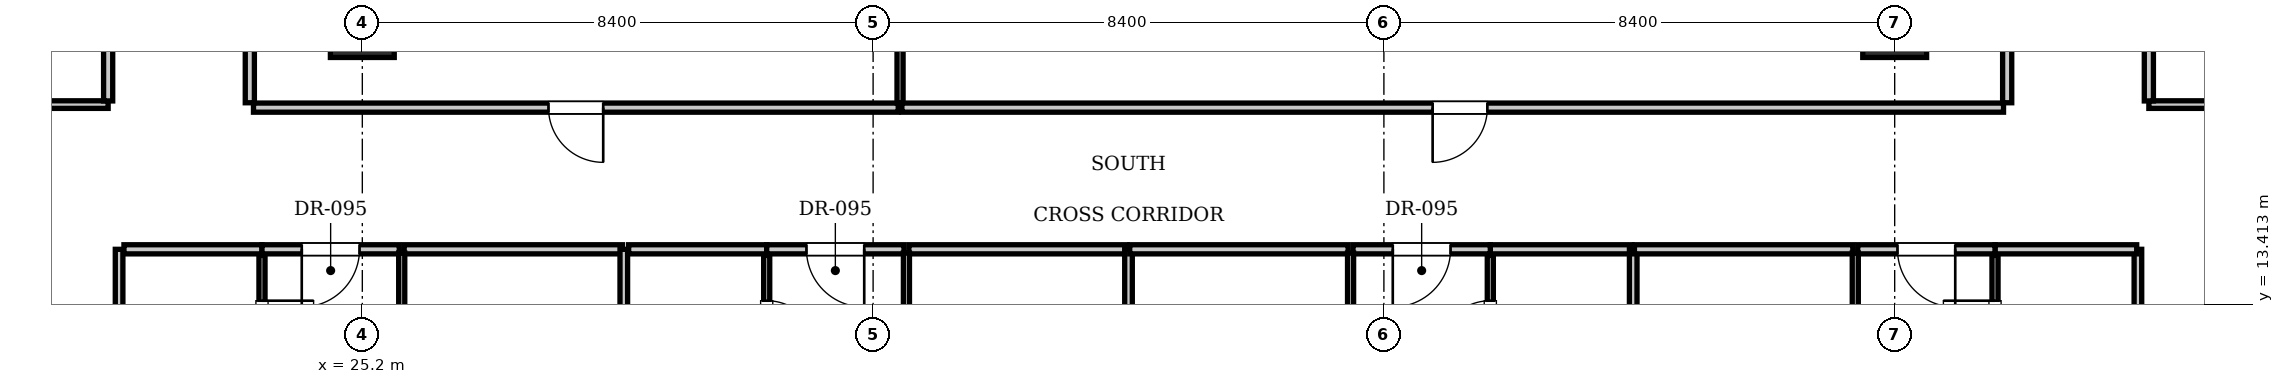
"""IFC4 building model, lengths in metres.
Left out: names, types, materials, properties, quantities, classifications, styles, units other than length and angle.
Written with IfcOpenShell. Run it as: python <this file> out.ifc"""

import sys

from ifc_helpers import new_model, si_unit, direction, frame, frame_2d, origin, origin_2d, place, context, subcontext, project, spatial, rectangle, extrude, element, fill, save


model = new_model("IFC4")
c1 = context("Model", 3, precision=1e-05, world=origin(), true_north=direction((0.0, 1.0)))
c2 = subcontext(c1, "Body", "Model", "MODEL_VIEW")
j1 = project(units=[si_unit("LENGTHUNIT", "METRE"), si_unit("PLANEANGLEUNIT", "RADIAN")], contexts=[c1])
p1 = place(None, origin())
s1 = spatial("IfcSite", under=j1, at=p1, CompositionType="ELEMENT")
p2 = place(p1, origin())
s2 = spatial("IfcBuilding", under=s1, at=p2, CompositionType="ELEMENT")
p3 = place(p2, frame((0.0, 0.0, 42.35)))
s3 = spatial("IfcBuildingStorey", under=s2, at=p3, CompositionType="ELEMENT", Elevation=42.35)
for number, where, z_axis, x_axis in (
    (1, (25.2, 18.0, 0.0), (0.0, 0.0, 1.0), (1.0, 0.0, 0.0)),
    (2, (50.4, 18.0, 0.0), (0.0, 0.0, 1.0), (1.0, 0.0, 0.0)),
):
    element("IfcColumn", number, at=place(p3, frame(where, z_axis=z_axis, x_axis=x_axis)), inside=s3, PredefinedType="COLUMN", context=c2, shape_type="SweptSolid", body=[
        extrude(rectangle(XDim=1.05, YDim=1.05, at=origin_2d()), origin(), (0.0, 0.0, 1.0), 3.85),
    ])
for number, where, z_axis, x_axis in (
    (3, (23.35, 16.73, 0.0), (0.0, 0.0, 1.0), (0.0, 1.0, 0.0)),
    (4, (52.25, 16.73, 0.0), (0.0, 0.0, 1.0), (0.0, 1.0, 0.0)),
):
    element("IfcWall", number, at=place(p3, frame(where, z_axis=z_axis, x_axis=x_axis)), inside=s3, PredefinedType="PARTITIONING", context=c2, shape_type="SweptSolid", body=[
        extrude(rectangle(XDim=7.53, YDim=0.15, at=frame_2d((3.765, 0.0))), origin(), (0.0, 0.0, 1.0), 3.61),
    ])
p4 = place(p3, frame((23.41, 16.65, 0.0), z_axis=(0.0, 0.0, 1.0), x_axis=(1.0, 0.0, 0.0)))
e5 = element("IfcWall", 5, at=p4, inside=s3, PredefinedType="PARTITIONING", context=c2, shape_type="SweptSolid", body=[
    extrude(rectangle(XDim=10.603, YDim=0.15, at=frame_2d((5.302, 0.0))), origin(), (0.0, 0.0, 1.0), 3.61),
])
p5 = place(p4, frame((4.852, 0.0, 0.0)))
e6 = element("IfcOpeningElement", 6, at=p5, cuts=e5, PredefinedType="OPENING", context=c2, shape_type="SweptSolid", body=[
    extrude(rectangle(XDim=0.9, YDim=2.1, at=frame_2d((0.45, 1.05))), frame((0.0, 0.085, 0.0), z_axis=(0.0, -1.0, 0.0), x_axis=(1.0, 0.0, 0.0)), (0.0, 0.0, 1.0), 0.17),
])
p6 = place(p3, frame((34.043, 16.73, 0.0), z_axis=(0.0, 0.0, 1.0), x_axis=(0.0, 1.0, 0.0)))
e7 = element("IfcWall", 7, at=p6, inside=s3, PredefinedType="PARTITIONING", context=c2, shape_type="SweptSolid", body=[
    extrude(rectangle(XDim=7.53, YDim=0.1, at=frame_2d((3.765, 0.0))), origin(), (0.0, 0.0, 1.0), 3.61),
])
p7 = place(p3, frame((34.073, 16.65, 0.0), z_axis=(0.0, 0.0, 1.0), x_axis=(1.0, 0.0, 0.0)))
e8 = element("IfcWall", 8, at=p7, inside=s3, PredefinedType="PARTITIONING", context=c2, shape_type="SweptSolid", body=[
    extrude(rectangle(XDim=18.117, YDim=0.15, at=frame_2d((9.059, 0.0))), origin(), (0.0, 0.0, 1.0), 3.61),
])
p8 = place(p7, frame((8.729, 0.0, 0.0)))
e9 = element("IfcOpeningElement", 9, at=p8, cuts=e8, PredefinedType="OPENING", context=c2, shape_type="SweptSolid", body=[
    extrude(rectangle(XDim=0.9, YDim=2.1, at=frame_2d((0.45, 1.05))), frame((0.0, 0.085, 0.0), z_axis=(0.0, -1.0, 0.0), x_axis=(1.0, 0.0, 0.0)), (0.0, 0.0, 1.0), 0.17),
])
for number, where, z_axis, x_axis in (
    (10, (21.2, 0.1, 0.0), (0.0, 0.0, 1.0), (0.0, 1.0, 0.0)),
    (11, (54.4, 0.1, 0.0), (0.0, 0.0, 1.0), (0.0, 1.0, 0.0)),
):
    element("IfcWall", number, at=place(p3, frame(where, z_axis=z_axis, x_axis=x_axis)), inside=s3, PredefinedType="PARTITIONING", context=c2, shape_type="SweptSolid", body=[
        extrude(rectangle(XDim=14.22, YDim=0.125, at=frame_2d((7.11, 0.0))), origin(), (0.0, 0.0, 1.0), 3.61),
    ])
p9 = place(p3, frame((21.28, 14.32, 0.0), z_axis=(0.0, 0.0, 1.0), x_axis=(1.0, 0.0, 0.0)))
e12 = element("IfcWall", 12, at=p9, inside=s3, PredefinedType="PARTITIONING", context=c2, shape_type="SweptSolid", body=[
    extrude(rectangle(XDim=2.27, YDim=0.15, at=frame_2d((1.135, 0.0))), origin(), (0.0, 0.0, 1.0), 3.61),
])
p10 = place(p3, frame((23.55, 11.88, 0.0), z_axis=(0.0, 0.0, 1.0), x_axis=(0.0, 1.0, 0.0)))
e13 = element("IfcWall", 13, at=p10, inside=s3, PredefinedType="PARTITIONING", context=c2, shape_type="SweptSolid", body=[
    extrude(rectangle(XDim=2.34, YDim=0.1, at=frame_2d((1.17, 0.0))), origin(), (0.0, 0.0, 1.0), 3.61),
])
p11 = place(p10, frame((0.745, 0.0, 0.0)))
e14 = element("IfcOpeningElement", 14, at=p11, cuts=e13, PredefinedType="OPENING", context=c2, shape_type="SweptSolid", body=[
    extrude(rectangle(XDim=0.85, YDim=2.1, at=frame_2d((0.425, 1.05))), frame((0.0, 0.06, 0.0), z_axis=(0.0, -1.0, 0.0), x_axis=(1.0, 0.0, 0.0)), (0.0, 0.0, 1.0), 0.12),
])
p12 = place(p3, frame((23.55, 14.32, 0.0), z_axis=(0.0, 0.0, 1.0), x_axis=(1.0, 0.0, 0.0)))
e15 = element("IfcWall", 15, at=p12, inside=s3, PredefinedType="PARTITIONING", context=c2, shape_type="SweptSolid", body=[
    extrude(rectangle(XDim=2.258, YDim=0.15, at=frame_2d((1.129, 0.0))), origin(), (0.0, 0.0, 1.0), 3.61),
])
p13 = place(p12, frame((0.654, 0.0, 0.0)))
e16 = element("IfcOpeningElement", 16, at=p13, cuts=e15, PredefinedType="OPENING", context=c2, shape_type="SweptSolid", body=[
    extrude(rectangle(XDim=0.95, YDim=2.15, at=frame_2d((0.475, 1.075))), frame((0.0, 0.085, 0.0), z_axis=(0.0, -1.0, 0.0), x_axis=(1.0, 0.0, 0.0)), (0.0, 0.0, 1.0), 0.17),
])
p14 = place(p3, frame((25.888, 14.32, 0.0), z_axis=(0.0, 0.0, 1.0), x_axis=(1.0, 0.0, 0.0)))
e17 = element("IfcWall", 17, at=p14, inside=s3, PredefinedType="PARTITIONING", context=c2, shape_type="SweptSolid", body=[
    extrude(rectangle(XDim=3.592, YDim=0.15, at=frame_2d((1.796, 0.0))), origin(), (0.0, 0.0, 1.0), 3.61),
])
p15 = place(p3, frame((25.848, 0.03, 0.0), z_axis=(0.0, 0.0, 1.0), x_axis=(0.0, 1.0, 0.0)))
e18 = element("IfcWall", 18, at=p15, inside=s3, PredefinedType="PARTITIONING", context=c2, shape_type="SweptSolid", body=[
    extrude(rectangle(XDim=14.23, YDim=0.1, at=frame_2d((7.115, 0.0))), origin(), (0.0, 0.0, 1.0), 3.61),
])
p16 = place(p15, frame((1.6, 0.0, 0.0)))
e19 = element("IfcOpeningElement", 19, at=p16, cuts=e18, PredefinedType="OPENING", context=c2, shape_type="SweptSolid", body=[
    extrude(rectangle(XDim=0.9, YDim=2.1, at=frame_2d((0.45, 1.05))), frame((0.0, 0.06, 0.0), z_axis=(0.0, -1.0, 0.0), x_axis=(1.0, 0.0, 0.0)), (0.0, 0.0, 1.0), 0.12),
])
p17 = place(p3, frame((29.5, 0.1, 0.0), z_axis=(0.0, 0.0, 1.0), x_axis=(0.0, 1.0, 0.0)))
e20 = element("IfcWall", 20, at=p17, inside=s3, PredefinedType="PARTITIONING", context=c2, shape_type="SweptSolid", body=[
    extrude(rectangle(XDim=14.22, YDim=0.125, at=frame_2d((7.11, 0.0))), origin(), (0.0, 0.0, 1.0), 3.207),
])
p18 = place(p3, frame((29.58, 14.32, 0.0), z_axis=(0.0, 0.0, 1.0), x_axis=(1.0, 0.0, 0.0)))
e21 = element("IfcWall", 21, at=p18, inside=s3, PredefinedType="PARTITIONING", context=c2, shape_type="SweptSolid", body=[
    extrude(rectangle(XDim=2.27, YDim=0.15, at=frame_2d((1.135, 0.0))), origin(), (0.0, 0.0, 1.0), 3.61),
])
p19 = place(p3, frame((31.85, 11.88, 0.0), z_axis=(0.0, 0.0, 1.0), x_axis=(0.0, 1.0, 0.0)))
e22 = element("IfcWall", 22, at=p19, inside=s3, PredefinedType="PARTITIONING", context=c2, shape_type="SweptSolid", body=[
    extrude(rectangle(XDim=2.34, YDim=0.1, at=frame_2d((1.17, 0.0))), origin(), (0.0, 0.0, 1.0), 3.61),
])
p20 = place(p19, frame((0.745, 0.0, 0.0)))
e23 = element("IfcOpeningElement", 23, at=p20, cuts=e22, PredefinedType="OPENING", context=c2, shape_type="SweptSolid", body=[
    extrude(rectangle(XDim=0.85, YDim=2.1, at=frame_2d((0.425, 1.05))), frame((0.0, 0.06, 0.0), z_axis=(0.0, -1.0, 0.0), x_axis=(1.0, 0.0, 0.0)), (0.0, 0.0, 1.0), 0.12),
])
p21 = place(p3, frame((31.85, 14.32, 0.0), z_axis=(0.0, 0.0, 1.0), x_axis=(1.0, 0.0, 0.0)))
e24 = element("IfcWall", 24, at=p21, inside=s3, PredefinedType="PARTITIONING", context=c2, shape_type="SweptSolid", body=[
    extrude(rectangle(XDim=2.258, YDim=0.15, at=frame_2d((1.129, 0.0))), origin(), (0.0, 0.0, 1.0), 3.61),
])
p22 = place(p21, frame((0.654, 0.0, 0.0)))
e25 = element("IfcOpeningElement", 25, at=p22, cuts=e24, PredefinedType="OPENING", context=c2, shape_type="SweptSolid", body=[
    extrude(rectangle(XDim=0.95, YDim=2.15, at=frame_2d((0.475, 1.075))), frame((0.0, 0.085, 0.0), z_axis=(0.0, -1.0, 0.0), x_axis=(1.0, 0.0, 0.0)), (0.0, 0.0, 1.0), 0.17),
])
p23 = place(p3, frame((34.188, 14.32, 0.0), z_axis=(0.0, 0.0, 1.0), x_axis=(1.0, 0.0, 0.0)))
e26 = element("IfcWall", 26, at=p23, inside=s3, PredefinedType="PARTITIONING", context=c2, shape_type="SweptSolid", body=[
    extrude(rectangle(XDim=3.592, YDim=0.15, at=frame_2d((1.796, 0.0))), origin(), (0.0, 0.0, 1.0), 3.61),
])
p24 = place(p3, frame((34.148, 0.03, 0.0), z_axis=(0.0, 0.0, 1.0), x_axis=(0.0, 1.0, 0.0)))
e27 = element("IfcWall", 27, at=p24, inside=s3, PredefinedType="PARTITIONING", context=c2, shape_type="SweptSolid", body=[
    extrude(rectangle(XDim=14.23, YDim=0.1, at=frame_2d((7.115, 0.0))), origin(), (0.0, 0.0, 1.0), 3.61),
])
p25 = place(p24, frame((1.6, 0.0, 0.0)))
e28 = element("IfcOpeningElement", 28, at=p25, cuts=e27, PredefinedType="OPENING", context=c2, shape_type="SweptSolid", body=[
    extrude(rectangle(XDim=0.9, YDim=2.1, at=frame_2d((0.45, 1.05))), frame((0.0, 0.06, 0.0), z_axis=(0.0, -1.0, 0.0), x_axis=(1.0, 0.0, 0.0)), (0.0, 0.0, 1.0), 0.12),
])
p26 = place(p3, frame((37.8, 0.1, 0.0), z_axis=(0.0, 0.0, 1.0), x_axis=(0.0, 1.0, 0.0)))
e29 = element("IfcWall", 29, at=p26, inside=s3, PredefinedType="PARTITIONING", context=c2, shape_type="SweptSolid", body=[
    extrude(rectangle(XDim=14.22, YDim=0.125, at=frame_2d((7.11, 0.0))), origin(), (0.0, 0.0, 1.0), 3.255),
])
p27 = place(p3, frame((43.75, 14.32, 0.0), z_axis=(0.0, 0.0, 1.0), x_axis=(1.0, 0.0, 0.0)))
e30 = element("IfcWall", 30, at=p27, inside=s3, PredefinedType="PARTITIONING", context=c2, shape_type="SweptSolid", body=[
    extrude(rectangle(XDim=2.33, YDim=0.15, at=frame_2d((1.165, 0.0))), origin(), (0.0, 0.0, 1.0), 3.61),
])
p28 = place(p3, frame((43.75, 11.88, 0.0), z_axis=(0.0, 0.0, 1.0), x_axis=(0.0, 1.0, 0.0)))
e31 = element("IfcWall", 31, at=p28, inside=s3, PredefinedType="PARTITIONING", context=c2, shape_type="SweptSolid", body=[
    extrude(rectangle(XDim=2.34, YDim=0.1, at=frame_2d((1.17, 0.0))), origin(), (0.0, 0.0, 1.0), 3.61),
])
p29 = place(p28, frame((0.745, 0.0, 0.0)))
e32 = element("IfcOpeningElement", 32, at=p29, cuts=e31, PredefinedType="OPENING", context=c2, shape_type="SweptSolid", body=[
    extrude(rectangle(XDim=0.85, YDim=2.1, at=frame_2d((0.425, 1.05))), frame((0.0, 0.06, 0.0), z_axis=(0.0, -1.0, 0.0), x_axis=(1.0, 0.0, 0.0)), (0.0, 0.0, 1.0), 0.12),
])
p30 = place(p3, frame((37.82, 14.32, 0.0), z_axis=(0.0, 0.0, 1.0), x_axis=(1.0, 0.0, 0.0)))
e33 = element("IfcWall", 33, at=p30, inside=s3, PredefinedType="PARTITIONING", context=c2, shape_type="SweptSolid", body=[
    extrude(rectangle(XDim=3.592, YDim=0.15, at=frame_2d((1.796, 0.0))), origin(), (0.0, 0.0, 1.0), 3.61),
])
p31 = place(p3, frame((41.492, 14.32, 0.0), z_axis=(0.0, 0.0, 1.0), x_axis=(1.0, 0.0, 0.0)))
e34 = element("IfcWall", 34, at=p31, inside=s3, PredefinedType="PARTITIONING", context=c2, shape_type="SweptSolid", body=[
    extrude(rectangle(XDim=2.258, YDim=0.15, at=frame_2d((1.129, 0.0))), origin(), (0.0, 0.0, 1.0), 3.61),
])
p32 = place(p31, frame((0.654, 0.0, 0.0)))
e35 = element("IfcOpeningElement", 35, at=p32, cuts=e34, PredefinedType="OPENING", context=c2, shape_type="SweptSolid", body=[
    extrude(rectangle(XDim=0.95, YDim=2.15, at=frame_2d((0.475, 1.075))), frame((0.0, 0.085, 0.0), z_axis=(0.0, -1.0, 0.0), x_axis=(1.0, 0.0, 0.0)), (0.0, 0.0, 1.0), 0.17),
])
p33 = place(p3, frame((41.452, 0.03, 0.0), z_axis=(0.0, 0.0, 1.0), x_axis=(0.0, 1.0, 0.0)))
e36 = element("IfcWall", 36, at=p33, inside=s3, PredefinedType="PARTITIONING", context=c2, shape_type="SweptSolid", body=[
    extrude(rectangle(XDim=14.23, YDim=0.1, at=frame_2d((7.115, 0.0))), origin(), (0.0, 0.0, 1.0), 3.61),
])
p34 = place(p33, frame((1.6, 0.0, 0.0)))
e37 = element("IfcOpeningElement", 37, at=p34, cuts=e36, PredefinedType="OPENING", context=c2, shape_type="SweptSolid", body=[
    extrude(rectangle(XDim=0.9, YDim=2.1, at=frame_2d((0.45, 1.05))), frame((0.0, 0.06, 0.0), z_axis=(0.0, -1.0, 0.0), x_axis=(1.0, 0.0, 0.0)), (0.0, 0.0, 1.0), 0.12),
])
p35 = place(p3, frame((46.1, 0.1, 0.0), z_axis=(0.0, 0.0, 1.0), x_axis=(0.0, 1.0, 0.0)))
e38 = element("IfcWall", 38, at=p35, inside=s3, PredefinedType="PARTITIONING", context=c2, shape_type="SweptSolid", body=[
    extrude(rectangle(XDim=14.22, YDim=0.125, at=frame_2d((7.11, 0.0))), origin(), (0.0, 0.0, 1.0), 3.293),
])
p36 = place(p3, frame((52.05, 14.32, 0.0), z_axis=(0.0, 0.0, 1.0), x_axis=(1.0, 0.0, 0.0)))
e39 = element("IfcWall", 39, at=p36, inside=s3, PredefinedType="PARTITIONING", context=c2, shape_type="SweptSolid", body=[
    extrude(rectangle(XDim=2.33, YDim=0.15, at=frame_2d((1.165, 0.0))), origin(), (0.0, 0.0, 1.0), 3.61),
])
p37 = place(p3, frame((52.05, 11.88, 0.0), z_axis=(0.0, 0.0, 1.0), x_axis=(0.0, 1.0, 0.0)))
e40 = element("IfcWall", 40, at=p37, inside=s3, PredefinedType="PARTITIONING", context=c2, shape_type="SweptSolid", body=[
    extrude(rectangle(XDim=2.34, YDim=0.1, at=frame_2d((1.17, 0.0))), origin(), (0.0, 0.0, 1.0), 3.61),
])
p38 = place(p37, frame((0.745, 0.0, 0.0)))
e41 = element("IfcOpeningElement", 41, at=p38, cuts=e40, PredefinedType="OPENING", context=c2, shape_type="SweptSolid", body=[
    extrude(rectangle(XDim=0.85, YDim=2.1, at=frame_2d((0.425, 1.05))), frame((0.0, 0.06, 0.0), z_axis=(0.0, -1.0, 0.0), x_axis=(1.0, 0.0, 0.0)), (0.0, 0.0, 1.0), 0.12),
])
p39 = place(p3, frame((46.12, 14.32, 0.0), z_axis=(0.0, 0.0, 1.0), x_axis=(1.0, 0.0, 0.0)))
e42 = element("IfcWall", 42, at=p39, inside=s3, PredefinedType="PARTITIONING", context=c2, shape_type="SweptSolid", body=[
    extrude(rectangle(XDim=3.592, YDim=0.15, at=frame_2d((1.796, 0.0))), origin(), (0.0, 0.0, 1.0), 3.61),
])
p40 = place(p3, frame((49.792, 14.32, 0.0), z_axis=(0.0, 0.0, 1.0), x_axis=(1.0, 0.0, 0.0)))
e43 = element("IfcWall", 43, at=p40, inside=s3, PredefinedType="PARTITIONING", context=c2, shape_type="SweptSolid", body=[
    extrude(rectangle(XDim=2.258, YDim=0.15, at=frame_2d((1.129, 0.0))), origin(), (0.0, 0.0, 1.0), 3.61),
])
p41 = place(p40, frame((0.654, 0.0, 0.0)))
e44 = element("IfcOpeningElement", 44, at=p41, cuts=e43, PredefinedType="OPENING", context=c2, shape_type="SweptSolid", body=[
    extrude(rectangle(XDim=0.95, YDim=2.15, at=frame_2d((0.475, 1.075))), frame((0.0, 0.085, 0.0), z_axis=(0.0, -1.0, 0.0), x_axis=(1.0, 0.0, 0.0)), (0.0, 0.0, 1.0), 0.17),
])
p42 = place(p3, frame((49.752, 0.03, 0.0), z_axis=(0.0, 0.0, 1.0), x_axis=(0.0, 1.0, 0.0)))
e45 = element("IfcWall", 45, at=p42, inside=s3, PredefinedType="PARTITIONING", context=c2, shape_type="SweptSolid", body=[
    extrude(rectangle(XDim=14.23, YDim=0.1, at=frame_2d((7.115, 0.0))), origin(), (0.0, 0.0, 1.0), 3.61),
])
p43 = place(p42, frame((1.6, 0.0, 0.0)))
e46 = element("IfcOpeningElement", 46, at=p43, cuts=e45, PredefinedType="OPENING", context=c2, shape_type="SweptSolid", body=[
    extrude(rectangle(XDim=0.9, YDim=2.1, at=frame_2d((0.45, 1.05))), frame((0.0, 0.06, 0.0), z_axis=(0.0, -1.0, 0.0), x_axis=(1.0, 0.0, 0.0)), (0.0, 0.0, 1.0), 0.12),
])
p44 = place(p3, frame((10.9, 16.7, 0.0), z_axis=(0.0, 0.0, 1.0), x_axis=(1.0, 0.0, 0.0)))
e47 = element("IfcWall", 47, at=p44, inside=s3, PredefinedType="PARTITIONING", context=c2, shape_type="SweptSolid", body=[
    extrude(rectangle(XDim=10.12, YDim=0.125, at=frame_2d((5.06, 0.0))), origin(), (0.0, 0.0, 1.0), 3.61),
])
p45 = place(p3, frame((54.58, 16.7, 0.0), z_axis=(0.0, 0.0, 1.0), x_axis=(1.0, 0.0, 0.0)))
e48 = element("IfcWall", 48, at=p45, inside=s3, PredefinedType="PARTITIONING", context=c2, shape_type="SweptSolid", body=[
    extrude(rectangle(XDim=10.12, YDim=0.125, at=frame_2d((5.06, 0.0))), origin(), (0.0, 0.0, 1.0), 3.61),
])
p46 = place(p3, frame((21.02, 16.76, 0.0), z_axis=(0.0, 0.0, 1.0), x_axis=(0.0, 1.0, 0.0)))
e49 = element("IfcWall", 49, at=p46, inside=s3, PredefinedType="PARTITIONING", context=c2, shape_type="SweptSolid", body=[
    extrude(rectangle(XDim=3.16, YDim=0.15, at=frame_2d((1.58, 0.0))), origin(), (0.0, 0.0, 1.0), 3.344),
])
p47 = place(p46, frame((1.105, 0.0, 0.0)))
e50 = element("IfcOpeningElement", 50, at=p47, cuts=e49, PredefinedType="OPENING", context=c2, shape_type="SweptSolid", body=[
    extrude(rectangle(XDim=0.95, YDim=2.15, at=frame_2d((0.475, 1.075))), frame((0.0, 0.085, 0.0), z_axis=(0.0, -1.0, 0.0), x_axis=(1.0, 0.0, 0.0)), (0.0, 0.0, 1.0), 0.17),
])
p48 = place(p3, frame((54.58, 16.76, 0.0), z_axis=(0.0, 0.0, 1.0), x_axis=(0.0, 1.0, 0.0)))
e51 = element("IfcWall", 51, at=p48, inside=s3, PredefinedType="PARTITIONING", context=c2, shape_type="SweptSolid", body=[
    extrude(rectangle(XDim=3.16, YDim=0.15, at=frame_2d((1.58, 0.0))), origin(), (0.0, 0.0, 1.0), 3.352),
])
p49 = place(p48, frame((1.105, 0.0, 0.0)))
e52 = element("IfcOpeningElement", 52, at=p49, cuts=e51, PredefinedType="OPENING", context=c2, shape_type="SweptSolid", body=[
    extrude(rectangle(XDim=0.95, YDim=2.15, at=frame_2d((0.475, 1.075))), frame((0.0, 0.085, 0.0), z_axis=(0.0, -1.0, 0.0), x_axis=(1.0, 0.0, 0.0)), (0.0, 0.0, 1.0), 0.17),
])
p50 = place(p5, frame((0.9, 0.0, 0.0), z_axis=(0.0, 0.0, 1.0), x_axis=(-1.0, 0.0, 0.0)))
e53 = element("IfcDoor", 53, at=p50, inside=s3, OperationType="SINGLE_SWING_LEFT", PredefinedType="DOOR", context=c2, shape_type="SweptSolid", body=[
    extrude(rectangle(XDim=0.9, YDim=2.1, at=frame_2d((0.45, 1.05))), frame((0.0, 0.025, 0.0), z_axis=(0.0, -1.0, 0.0), x_axis=(1.0, 0.0, 0.0)), (0.0, 0.0, 1.0), 0.05),
])
fill(e6, e53)
p51 = place(p8, frame((0.9, 0.0, 0.0), z_axis=(0.0, 0.0, 1.0), x_axis=(-1.0, 0.0, 0.0)))
e54 = element("IfcDoor", 54, at=p51, inside=s3, OperationType="SINGLE_SWING_RIGHT", PredefinedType="DOOR", context=c2, shape_type="SweptSolid", body=[
    extrude(rectangle(XDim=0.9, YDim=2.1, at=frame_2d((0.45, 1.05))), frame((0.0, 0.025, 0.0), z_axis=(0.0, -1.0, 0.0), x_axis=(1.0, 0.0, 0.0)), (0.0, 0.0, 1.0), 0.05),
])
fill(e9, e54)
p52 = place(p11, frame((0.85, 0.0, 0.0), z_axis=(0.0, 0.0, 1.0), x_axis=(-1.0, 0.0, 0.0)))
e55 = element("IfcDoor", 55, at=p52, inside=s3, OperationType="SINGLE_SWING_LEFT", PredefinedType="DOOR", context=c2, shape_type="SweptSolid", body=[
    extrude(rectangle(XDim=0.85, YDim=2.1, at=frame_2d((0.425, 1.05))), frame((0.0, 0.025, 0.0), z_axis=(0.0, -1.0, 0.0), x_axis=(1.0, 0.0, 0.0)), (0.0, 0.0, 1.0), 0.05),
])
fill(e14, e55)
p53 = place(p13, frame((0.95, 0.0, 0.0), z_axis=(0.0, 0.0, 1.0), x_axis=(-1.0, 0.0, 0.0)))
e56 = element("IfcDoor", 56, at=p53, inside=s3, OperationType="SINGLE_SWING_RIGHT", PredefinedType="DOOR", context=c2, shape_type="SweptSolid", body=[
    extrude(rectangle(XDim=0.95, YDim=2.15, at=frame_2d((0.475, 1.075))), frame((0.0, 0.025, 0.0), z_axis=(0.0, -1.0, 0.0), x_axis=(1.0, 0.0, 0.0)), (0.0, 0.0, 1.0), 0.05),
])
fill(e16, e56)
p54 = place(p20, frame((0.85, 0.0, 0.0), z_axis=(0.0, 0.0, 1.0), x_axis=(-1.0, 0.0, 0.0)))
e57 = element("IfcDoor", 57, at=p54, inside=s3, OperationType="SINGLE_SWING_RIGHT", PredefinedType="DOOR", context=c2, shape_type="SweptSolid", body=[
    extrude(rectangle(XDim=0.85, YDim=2.1, at=frame_2d((0.425, 1.05))), frame((0.0, 0.025, 0.0), z_axis=(0.0, -1.0, 0.0), x_axis=(1.0, 0.0, 0.0)), (0.0, 0.0, 1.0), 0.05),
])
fill(e23, e57)
p55 = place(p22, frame((0.95, 0.0, 0.0), z_axis=(0.0, 0.0, 1.0), x_axis=(-1.0, 0.0, 0.0)))
e58 = element("IfcDoor", 58, at=p55, inside=s3, OperationType="SINGLE_SWING_LEFT", PredefinedType="DOOR", context=c2, shape_type="SweptSolid", body=[
    extrude(rectangle(XDim=0.95, YDim=2.15, at=frame_2d((0.475, 1.075))), frame((0.0, 0.025, 0.0), z_axis=(0.0, -1.0, 0.0), x_axis=(1.0, 0.0, 0.0)), (0.0, 0.0, 1.0), 0.05),
])
fill(e25, e58)
p56 = place(p29, origin())
e59 = element("IfcDoor", 59, at=p56, inside=s3, OperationType="SINGLE_SWING_LEFT", PredefinedType="DOOR", context=c2, shape_type="SweptSolid", body=[
    extrude(rectangle(XDim=0.85, YDim=2.1, at=frame_2d((0.425, 1.05))), frame((0.0, 0.025, 0.0), z_axis=(0.0, -1.0, 0.0), x_axis=(1.0, 0.0, 0.0)), (0.0, 0.0, 1.0), 0.05),
])
fill(e32, e59)
p57 = place(p32, frame((0.95, 0.0, 0.0), z_axis=(0.0, 0.0, 1.0), x_axis=(-1.0, 0.0, 0.0)))
e60 = element("IfcDoor", 60, at=p57, inside=s3, OperationType="SINGLE_SWING_RIGHT", PredefinedType="DOOR", context=c2, shape_type="SweptSolid", body=[
    extrude(rectangle(XDim=0.95, YDim=2.15, at=frame_2d((0.475, 1.075))), frame((0.0, 0.025, 0.0), z_axis=(0.0, -1.0, 0.0), x_axis=(1.0, 0.0, 0.0)), (0.0, 0.0, 1.0), 0.05),
])
fill(e35, e60)
p58 = place(p38, origin())
e61 = element("IfcDoor", 61, at=p58, inside=s3, OperationType="SINGLE_SWING_RIGHT", PredefinedType="DOOR", context=c2, shape_type="SweptSolid", body=[
    extrude(rectangle(XDim=0.85, YDim=2.1, at=frame_2d((0.425, 1.05))), frame((0.0, 0.025, 0.0), z_axis=(0.0, -1.0, 0.0), x_axis=(1.0, 0.0, 0.0)), (0.0, 0.0, 1.0), 0.05),
])
fill(e41, e61)
p59 = place(p41, frame((0.95, 0.0, 0.0), z_axis=(0.0, 0.0, 1.0), x_axis=(-1.0, 0.0, 0.0)))
e62 = element("IfcDoor", 62, at=p59, inside=s3, OperationType="SINGLE_SWING_LEFT", PredefinedType="DOOR", context=c2, shape_type="SweptSolid", body=[
    extrude(rectangle(XDim=0.95, YDim=2.15, at=frame_2d((0.475, 1.075))), frame((0.0, 0.025, 0.0), z_axis=(0.0, -1.0, 0.0), x_axis=(1.0, 0.0, 0.0)), (0.0, 0.0, 1.0), 0.05),
])
fill(e44, e62)
save(model, sys.argv[1])
